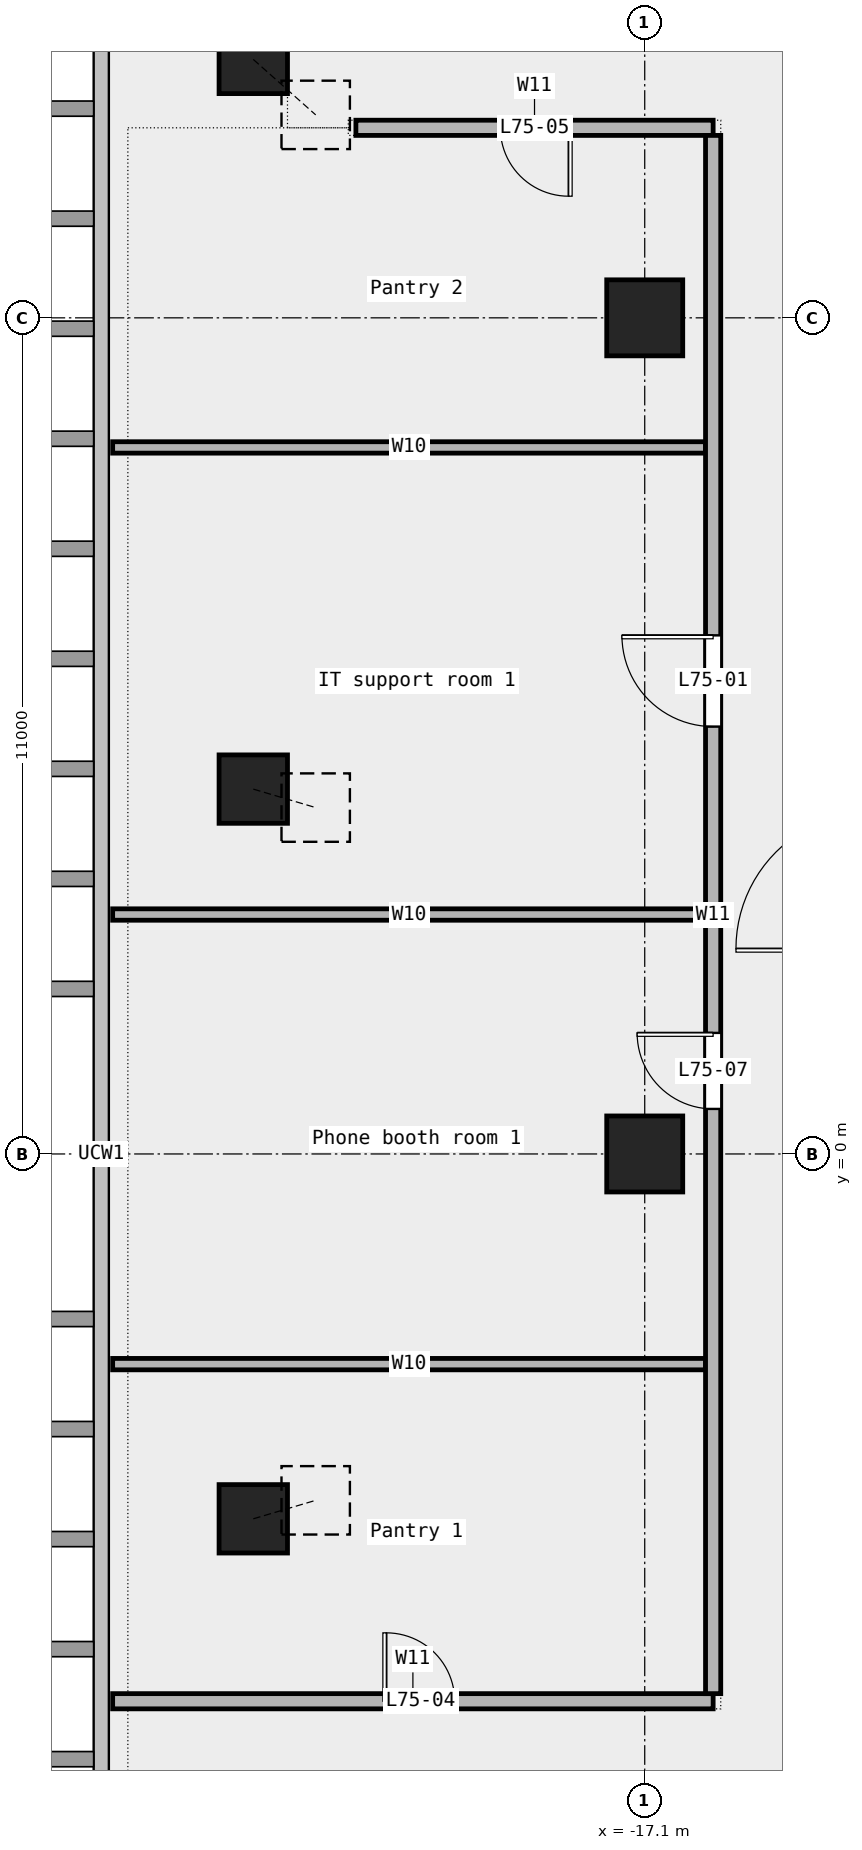
"""IFC4 building model, lengths in metres.
Left out: names, types, materials, properties, quantities, classifications, styles, units other than length and angle.
Written with IfcOpenShell. Run it as: python <this file> out.ifc"""

import sys

from ifc_helpers import new_model, si_unit, direction, frame, frame_2d, origin, origin_2d, place, context, subcontext, project, spatial, rectangle, extrude, element, fill, save


model = new_model("IFC4")
c1 = context("Model", 3, precision=1e-05, world=origin(), true_north=direction((0.0, 1.0)))
c2 = subcontext(c1, "Body", "Model", "MODEL_VIEW")
j1 = project(units=[si_unit("LENGTHUNIT", "METRE"), si_unit("PLANEANGLEUNIT", "RADIAN")], contexts=[c1])
p1 = place(None, origin())
s1 = spatial("IfcSite", under=j1, at=p1, CompositionType="ELEMENT")
p2 = place(p1, origin())
s2 = spatial("IfcBuilding", under=s1, at=p2, CompositionType="ELEMENT")
p3 = place(p2, frame((0.0, 0.0, 345.4)))
s3 = spatial("IfcBuildingStorey", under=s2, at=p3, CompositionType="ELEMENT", Elevation=345.4)
p4 = place(p3, frame((-22.25, 14.4, 0.0), z_axis=(0.215392776624, -0.191438896619, 0.95757876994), x_axis=(0.664322452257, 0.747446104697, 0.0)))
e1 = element("IfcColumn", 1, at=p4, inside=s3, PredefinedType="COLUMN", context=c2, shape_type="SweptSolid", body=[
    extrude(rectangle(XDim=0.9, YDim=0.9, at=origin_2d()), origin(), (0.0, 0.0, 1.0), 3.812),
])
for number, where, z_axis, x_axis in (
    (2, (-22.25, 4.8, 0.0), (0.219, -0.065, 0.974), (0.284, 0.959, 0.0)),
    (3, (-22.25, -4.8, 0.0), (0.219, 0.065, 0.974), (-0.284, 0.959, 0.0)),
):
    element("IfcColumn", number, at=place(p3, frame(where, z_axis=z_axis, x_axis=x_axis)), inside=s3, PredefinedType="COLUMN", context=c2, shape_type="SweptSolid", body=[
        extrude(rectangle(XDim=0.9, YDim=0.9, at=origin_2d()), origin(), (0.0, 0.0, 1.0), 3.749),
    ])
for number, where, z_axis, x_axis in (
    (4, (-17.1, 0.0, 0.0), (0.0, 0.0, 1.0), (1.0, 0.0, 0.0)),
    (5, (-17.1, 11.0, 0.0), (0.0, 0.0, 1.0), (1.0, 0.0, 0.0)),
):
    element("IfcColumn", number, at=place(p3, frame(where, z_axis=z_axis, x_axis=x_axis)), inside=s3, PredefinedType="COLUMN", context=c2, shape_type="SweptSolid", body=[
        extrude(rectangle(XDim=1.0, YDim=1.0, at=origin_2d()), origin(), (0.0, 0.0, 1.0), 3.65),
    ])
p5 = place(p3, frame((-24.1, -7.2, 0.0), z_axis=(0.0, 0.0, 1.0), x_axis=(1.0, 0.0, 0.0)))
e6 = element("IfcWall", 6, at=p5, inside=s3, PredefinedType="PARTITIONING", context=c2, shape_type="SweptSolid", body=[
    extrude(rectangle(XDim=7.9, YDim=0.2, at=frame_2d((3.95, 0.0))), origin(), (0.0, 0.0, 1.0), 3.65),
])
p6 = place(p5, frame((3.6, 0.0, 0.0)))
e7 = element("IfcOpeningElement", 7, at=p6, cuts=e6, PredefinedType="OPENING", context=c2, shape_type="SweptSolid", body=[
    extrude(rectangle(XDim=0.9, YDim=2.1, at=frame_2d((0.45, 1.05))), frame((0.0, 0.112, 0.0), z_axis=(0.0, -1.0, 0.0), x_axis=(1.0, 0.0, 0.0)), (0.0, 0.0, 1.0), 0.224),
])
for number, where, z_axis, x_axis in (
    (8, (-24.1, -2.765, 0.0), (0.0, 0.0, 1.0), (1.0, 0.0, 0.0)),
    (9, (-24.1, 3.15, 0.0), (0.0, 0.0, 1.0), (1.0, 0.0, 0.0)),
    (10, (-24.1, 9.295, 0.0), (0.0, 0.0, 1.0), (1.0, 0.0, 0.0)),
):
    element("IfcWall", number, at=place(p3, frame(where, z_axis=z_axis, x_axis=x_axis)), inside=s3, PredefinedType="PARTITIONING", context=c2, shape_type="SweptSolid", body=[
        extrude(rectangle(XDim=7.8, YDim=0.15, at=frame_2d((3.9, 0.0))), origin(), (0.0, 0.0, 1.0), 3.65),
    ])
p7 = place(p3, frame((-20.9, 13.5, 0.0), z_axis=(0.0, 0.0, 1.0), x_axis=(1.0, 0.0, 0.0)))
e11 = element("IfcWall", 11, at=p7, inside=s3, PredefinedType="PARTITIONING", context=c2, shape_type="SweptSolid", body=[
    extrude(rectangle(XDim=4.7, YDim=0.2, at=frame_2d((2.35, 0.0))), origin(), (0.0, 0.0, 1.0), 3.65),
])
p8 = place(p7, frame((1.9, 0.0, 0.0)))
e12 = element("IfcOpeningElement", 12, at=p8, cuts=e11, PredefinedType="OPENING", context=c2, shape_type="SweptSolid", body=[
    extrude(rectangle(XDim=0.9, YDim=2.1, at=frame_2d((0.45, 1.05))), frame((0.0, 0.112, 0.0), z_axis=(0.0, -1.0, 0.0), x_axis=(1.0, 0.0, 0.0)), (0.0, 0.0, 1.0), 0.224),
])
p9 = place(p3, frame((-16.2, -7.1, 0.0), z_axis=(0.0, 0.0, 1.0), x_axis=(0.0, 1.0, 0.0)))
e13 = element("IfcWall", 13, at=p9, inside=s3, PredefinedType="PARTITIONING", context=c2, shape_type="SweptSolid", body=[
    extrude(rectangle(XDim=20.5, YDim=0.2, at=frame_2d((10.25, 0.0))), origin(), (0.0, 0.0, 1.0), 3.65),
])
p10 = place(p9, frame((12.722, 0.0, 0.0)))
e14 = element("IfcOpeningElement", 14, at=p10, cuts=e13, PredefinedType="OPENING", context=c2, shape_type="SweptSolid", body=[
    extrude(rectangle(XDim=1.2, YDim=2.1, at=frame_2d((0.6, 1.05))), frame((0.0, 0.112, 0.0), z_axis=(0.0, -1.0, 0.0), x_axis=(1.0, 0.0, 0.0)), (0.0, 0.0, 1.0), 0.224),
])
p11 = place(p9, frame((7.692, 0.0, 0.0)))
e15 = element("IfcOpeningElement", 15, at=p11, cuts=e13, PredefinedType="OPENING", context=c2, shape_type="SweptSolid", body=[
    extrude(rectangle(XDim=1.0, YDim=2.1, at=frame_2d((0.5, 1.05))), frame((0.0, 0.112, 0.0), z_axis=(0.0, -1.0, 0.0), x_axis=(1.0, 0.0, 0.0)), (0.0, 0.0, 1.0), 0.224),
])
p12 = place(p10, origin())
e16 = element("IfcDoor", 16, at=p12, inside=s3, OperationType="SINGLE_SWING_RIGHT", PredefinedType="DOOR", context=c2, shape_type="SweptSolid", body=[
    extrude(rectangle(XDim=1.2, YDim=2.1, at=frame_2d((0.6, 1.05))), frame((0.0, 0.025, 0.0), z_axis=(0.0, -1.0, 0.0), x_axis=(1.0, 0.0, 0.0)), (0.0, 0.0, 1.0), 0.05),
])
fill(e14, e16)
p13 = place(p6, origin())
e17 = element("IfcDoor", 17, at=p13, inside=s3, OperationType="SINGLE_SWING_LEFT", PredefinedType="DOOR", context=c2, shape_type="SweptSolid", body=[
    extrude(rectangle(XDim=0.9, YDim=2.1, at=frame_2d((0.45, 1.05))), frame((0.0, 0.025, 0.0), z_axis=(0.0, -1.0, 0.0), x_axis=(1.0, 0.0, 0.0)), (0.0, 0.0, 1.0), 0.05),
])
fill(e7, e17)
p14 = place(p8, origin())
e18 = element("IfcDoor", 18, at=p14, inside=s3, OperationType="SINGLE_SWING_LEFT", PredefinedType="DOOR", context=c2, shape_type="SweptSolid", body=[
    extrude(rectangle(XDim=0.9, YDim=2.1, at=frame_2d((0.45, 1.05))), frame((0.0, 0.025, 0.0), z_axis=(0.0, -1.0, 0.0), x_axis=(1.0, 0.0, 0.0)), (0.0, 0.0, 1.0), 0.05),
])
fill(e12, e18)
p15 = place(p11, origin())
e19 = element("IfcDoor", 19, at=p15, inside=s3, OperationType="SINGLE_SWING_RIGHT", PredefinedType="DOOR", context=c2, shape_type="SweptSolid", body=[
    extrude(rectangle(XDim=1.0, YDim=2.1, at=frame_2d((0.5, 1.05))), frame((0.0, 0.025, 0.0), z_axis=(0.0, -1.0, 0.0), x_axis=(1.0, 0.0, 0.0)), (0.0, 0.0, 1.0), 0.05),
])
fill(e15, e19)
save(model, sys.argv[1])
